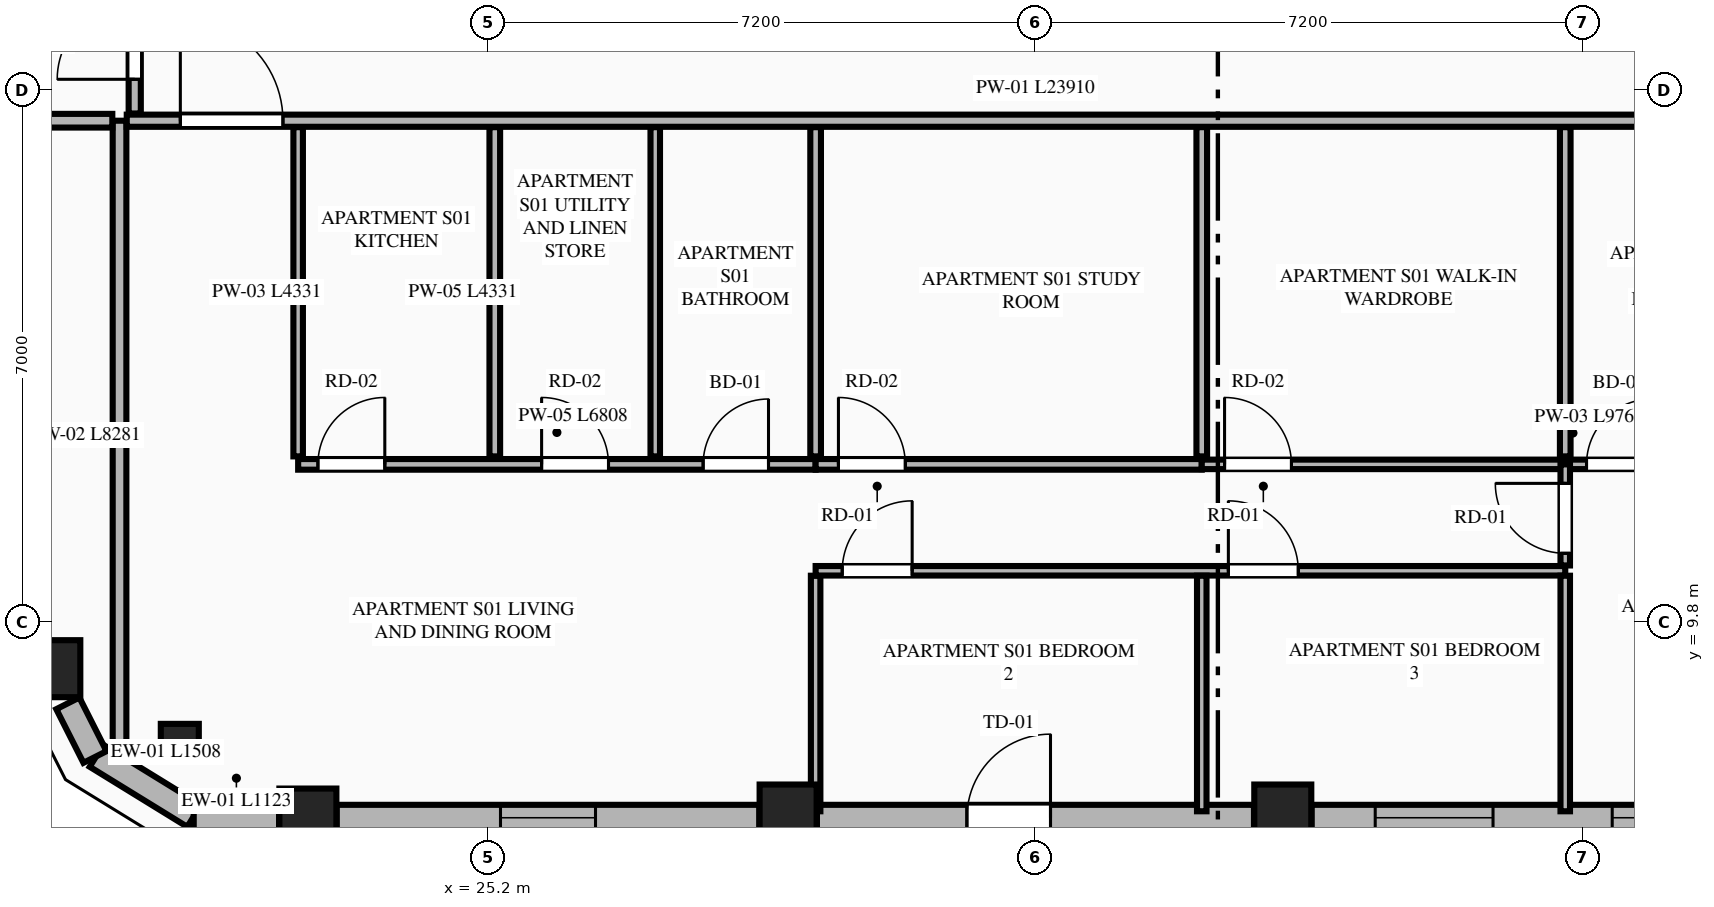
"""IFC4 building model, lengths in metres.
Left out: names, types, materials, properties, quantities, classifications, styles, units other than length and angle.
Written with IfcOpenShell. Run it as: python <this file> out.ifc"""

import sys

from ifc_helpers import new_model, si_unit, direction, frame, frame_2d, origin, origin_2d, place, context, subcontext, project, spatial, rectangle, extrude, element, fill, save


model = new_model("IFC4")
c1 = context("Model", 3, precision=1e-05, world=origin(), true_north=direction((0.0, 1.0)))
c2 = subcontext(c1, "Body", "Model", "MODEL_VIEW")
j1 = project(units=[si_unit("LENGTHUNIT", "METRE"), si_unit("PLANEANGLEUNIT", "RADIAN")], contexts=[c1])
p1 = place(None, origin())
s1 = spatial("IfcSite", under=j1, at=p1, CompositionType="ELEMENT")
p2 = place(p1, origin())
s2 = spatial("IfcBuilding", under=s1, at=p2, CompositionType="ELEMENT")
p3 = place(p2, frame((0.0, 0.0, 248.9)))
s3 = spatial("IfcBuildingStorey", under=s2, at=p3, CompositionType="ELEMENT", Elevation=248.9)
for number, where, z_axis, x_axis in (
    (1, (22.828, 7.239, 0.0), (0.0, 0.0, 1.0), (1.0, 0.0, 0.0)),
    (2, (29.146, 7.292, 0.0), (0.0, 0.0, 1.0), (1.0, 0.0, 0.0)),
    (3, (35.654, 7.292, 0.0), (0.0, 0.0, 1.0), (1.0, 0.0, 0.0)),
    (4, (19.459, 9.191, 0.0), (0.0, 0.0, 1.0), (1.0, 0.0, 0.0)),
):
    element("IfcColumn", number, at=place(p3, frame(where, z_axis=z_axis, x_axis=x_axis)), inside=s3, PredefinedType="COLUMN", context=c2, shape_type="SweptSolid", body=[
        extrude(rectangle(XDim=0.75, YDim=0.75, at=origin_2d()), origin(), (0.0, 0.0, 1.0), 3.65),
    ])
p4 = place(p3, frame((21.143, 8.215, 0.0), z_axis=(0.0, 0.0, 1.0), x_axis=(0.865256437757, -0.501329529272, 0.0)))
e5 = element("IfcColumn", 5, at=p4, inside=s3, PredefinedType="PILASTER", context=c2, shape_type="SweptSolid", body=[
    extrude(rectangle(XDim=0.5, YDim=0.35, at=origin_2d()), origin(), (0.0, 0.0, 1.0), 3.65),
])
p5 = place(p3, frame((20.047, 8.045, 0.0), z_axis=(0.0, 0.0, 1.0), x_axis=(0.851680557619, -0.52406128246, 0.0)))
e6 = element("IfcWall", 6, at=p5, inside=s3, PredefinedType="STANDARD", context=c2, shape_type="SweptSolid", body=[
    extrude(rectangle(XDim=1.508, YDim=0.34, at=frame_2d((0.754, 0.0))), origin(), (0.0, 0.0, 1.0), 3.45),
])
p6 = place(p3, frame((21.326, 7.23, 0.0), z_axis=(0.0, 0.0, 1.0), x_axis=(1.0, 0.0, 0.0)))
e7 = element("IfcWall", 7, at=p6, inside=s3, PredefinedType="STANDARD", context=c2, shape_type="SweptSolid", body=[
    extrude(rectangle(XDim=1.123, YDim=0.34, at=frame_2d((0.562, 0.0))), origin(), (0.0, 0.0, 1.0), 3.45),
])
p7 = place(p3, frame((23.207, 7.23, 0.0), z_axis=(0.0, 0.0, 1.0), x_axis=(1.0, 0.0, 0.0)))
e8 = element("IfcWall", 8, at=p7, inside=s3, PredefinedType="STANDARD", context=c2, shape_type="SweptSolid", body=[
    extrude(rectangle(XDim=5.56, YDim=0.34, at=frame_2d((2.78, 0.0))), origin(), (0.0, 0.0, 1.0), 2.983),
])
p8 = place(p7, frame((2.155, 0.0, 0.75)))
e9 = element("IfcOpeningElement", 9, at=p8, cuts=e8, PredefinedType="OPENING", context=c2, shape_type="SweptSolid", body=[
    extrude(rectangle(XDim=1.25, YDim=1.95, at=frame_2d((0.625, 0.975))), frame((0.0, 0.18, 0.0), z_axis=(0.0, -1.0, 0.0), x_axis=(1.0, 0.0, 0.0)), (0.0, 0.0, 1.0), 0.36),
])
p9 = place(p3, frame((29.525, 7.23, 0.0), z_axis=(0.0, 0.0, 1.0), x_axis=(1.0, 0.0, 0.0)))
e10 = element("IfcWall", 10, at=p9, inside=s3, PredefinedType="STANDARD", context=c2, shape_type="SweptSolid", body=[
    extrude(rectangle(XDim=5.75, YDim=0.34, at=frame_2d((2.875, 0.0))), origin(), (0.0, 0.0, 1.0), 2.983),
])
p10 = place(p9, frame((1.973, 0.0, 0.0)))
e11 = element("IfcOpeningElement", 11, at=p10, cuts=e10, PredefinedType="OPENING", context=c2, shape_type="SweptSolid", body=[
    extrude(rectangle(XDim=1.1, YDim=2.25, at=frame_2d((0.55, 1.125))), frame((0.0, 0.18, 0.0), z_axis=(0.0, -1.0, 0.0), x_axis=(1.0, 0.0, 0.0)), (0.0, 0.0, 1.0), 0.36),
])
p11 = place(p3, frame((36.033, 7.23, 0.0), z_axis=(0.0, 0.0, 1.0), x_axis=(1.0, 0.0, 0.0)))
e12 = element("IfcWall", 12, at=p11, inside=s3, PredefinedType="STANDARD", context=c2, shape_type="SweptSolid", body=[
    extrude(rectangle(XDim=5.56, YDim=0.34, at=frame_2d((2.78, 0.0))), origin(), (0.0, 0.0, 1.0), 2.983),
])
p12 = place(p11, frame((0.837, 0.0, 0.75)))
e13 = element("IfcOpeningElement", 13, at=p12, cuts=e12, PredefinedType="OPENING", context=c2, shape_type="SweptSolid", body=[
    extrude(rectangle(XDim=1.55, YDim=2.05, at=frame_2d((0.775, 1.025))), frame((0.0, 0.18, 0.0), z_axis=(0.0, -1.0, 0.0), x_axis=(1.0, 0.0, 0.0)), (0.0, 0.0, 1.0), 0.36),
])
p13 = place(p11, frame((3.955, 0.0, 0.75)))
e14 = element("IfcOpeningElement", 14, at=p13, cuts=e12, PredefinedType="OPENING", context=c2, shape_type="SweptSolid", body=[
    extrude(rectangle(XDim=1.1, YDim=2.0, at=frame_2d((0.55, 1.0))), frame((0.0, 0.18, 0.0), z_axis=(0.0, -1.0, 0.0), x_axis=(1.0, 0.0, 0.0)), (0.0, 0.0, 1.0), 0.36),
])
p14 = place(p3, frame((19.67, 8.735, 0.0), z_axis=(0.0, 0.0, 1.0), x_axis=(0.451404919072, -0.89231922485, 0.0)))
e15 = element("IfcWall", 15, at=p14, inside=s3, PredefinedType="STANDARD", context=c2, shape_type="SweptSolid", body=[
    extrude(rectangle(XDim=0.791, YDim=0.34, at=frame_2d((0.396, 0.0))), origin(), (0.0, 0.0, 1.0), 3.45),
])
p15 = place(p3, frame((20.35, 8.119, 0.0), z_axis=(0.0, 0.0, 1.0), x_axis=(0.0, 1.0, 0.0)))
e16 = element("IfcWall", 16, at=p15, inside=s3, PredefinedType="PARTITIONING", context=c2, shape_type="SweptSolid", body=[
    extrude(rectangle(XDim=8.281, YDim=0.18, at=frame_2d((4.141, 0.0))), origin(), (0.0, 0.0, 1.0), 3.45),
])
p16 = place(p3, frame((20.445, 16.4, 0.0), z_axis=(0.0, 0.0, 1.0), x_axis=(1.0, 0.0, 0.0)))
e17 = element("IfcWall", 17, at=p16, inside=s3, PredefinedType="PARTITIONING", context=c2, shape_type="SweptSolid", body=[
    extrude(rectangle(XDim=23.91, YDim=0.16, at=frame_2d((11.955, 0.0))), origin(), (0.0, 0.0, 1.0), 3.45),
])
p17 = place(p16, frame((0.705, 0.0, 0.0)))
e18 = element("IfcOpeningElement", 18, at=p17, cuts=e17, PredefinedType="OPENING", context=c2, shape_type="SweptSolid", body=[
    extrude(rectangle(XDim=1.35, YDim=2.35, at=frame_2d((0.675, 1.175))), frame((0.0, 0.09, 0.0), z_axis=(0.0, -1.0, 0.0), x_axis=(1.0, 0.0, 0.0)), (0.0, 0.0, 1.0), 0.18),
])
p18 = place(p3, frame((22.7, 11.984, 0.0), z_axis=(0.0, 0.0, 1.0), x_axis=(0.0, 1.0, 0.0)))
e19 = element("IfcWall", 19, at=p18, inside=s3, PredefinedType="PARTITIONING", context=c2, shape_type="SweptSolid", body=[
    extrude(rectangle(XDim=4.331, YDim=0.125, at=frame_2d((2.166, 0.0))), origin(), (0.0, 0.0, 1.0), 2.907),
])
p19 = place(p3, frame((22.7, 11.879, 0.0), z_axis=(0.0, 0.0, 1.0), x_axis=(1.0, 0.0, 0.0)))
e20 = element("IfcWall", 20, at=p19, inside=s3, PredefinedType="PLUMBINGWALL", context=c2, shape_type="SweptSolid", body=[
    extrude(rectangle(XDim=6.808, YDim=0.14, at=frame_2d((3.404, 0.0))), origin(), (0.0, 0.0, 1.0), 3.45),
])
p20 = place(p19, frame((5.328, 0.0, 0.0)))
e21 = element("IfcOpeningElement", 21, at=p20, cuts=e20, PredefinedType="OPENING", context=c2, shape_type="SweptSolid", body=[
    extrude(rectangle(XDim=0.86, YDim=2.1, at=frame_2d((0.43, 1.05))), frame((0.0, 0.08, 0.0), z_axis=(0.0, -1.0, 0.0), x_axis=(1.0, 0.0, 0.0)), (0.0, 0.0, 1.0), 0.16),
])
p21 = place(p19, frame((0.26, 0.0, 0.0)))
e22 = element("IfcOpeningElement", 22, at=p21, cuts=e20, PredefinedType="OPENING", context=c2, shape_type="SweptSolid", body=[
    extrude(rectangle(XDim=0.88, YDim=2.15, at=frame_2d((0.44, 1.075))), frame((0.0, 0.08, 0.0), z_axis=(0.0, -1.0, 0.0), x_axis=(1.0, 0.0, 0.0)), (0.0, 0.0, 1.0), 0.16),
])
p22 = place(p19, frame((3.203, 0.0, 0.0)))
e23 = element("IfcOpeningElement", 23, at=p22, cuts=e20, PredefinedType="OPENING", context=c2, shape_type="SweptSolid", body=[
    extrude(rectangle(XDim=0.88, YDim=2.15, at=frame_2d((0.44, 1.075))), frame((0.0, 0.08, 0.0), z_axis=(0.0, -1.0, 0.0), x_axis=(1.0, 0.0, 0.0)), (0.0, 0.0, 1.0), 0.16),
])
p23 = place(p3, frame((29.508, 11.879, 0.0), z_axis=(0.0, 0.0, 1.0), x_axis=(1.0, 0.0, 0.0)))
e24 = element("IfcWall", 24, at=p23, inside=s3, PredefinedType="PLUMBINGWALL", context=c2, shape_type="SweptSolid", body=[
    extrude(rectangle(XDim=5.08, YDim=0.14, at=frame_2d((2.54, 0.0))), origin(), (0.0, 0.0, 1.0), 3.45),
])
p24 = place(p23, frame((0.3, 0.0, 0.0)))
e25 = element("IfcOpeningElement", 25, at=p24, cuts=e24, PredefinedType="OPENING", context=c2, shape_type="SweptSolid", body=[
    extrude(rectangle(XDim=0.88, YDim=2.15, at=frame_2d((0.44, 1.075))), frame((0.0, 0.08, 0.0), z_axis=(0.0, -1.0, 0.0), x_axis=(1.0, 0.0, 0.0)), (0.0, 0.0, 1.0), 0.16),
])
p25 = place(p3, frame((34.588, 11.879, 0.0), z_axis=(0.0, 0.0, 1.0), x_axis=(1.0, 0.0, 0.0)))
e26 = element("IfcWall", 26, at=p25, inside=s3, PredefinedType="PARTITIONING", context=c2, shape_type="SweptSolid", body=[
    extrude(rectangle(XDim=9.767, YDim=0.125, at=frame_2d((4.884, 0.0))), origin(), (0.0, 0.0, 1.0), 3.45),
])
p26 = place(p25, frame((5.062, 0.0, 0.0)))
e27 = element("IfcOpeningElement", 27, at=p26, cuts=e26, PredefinedType="OPENING", context=c2, shape_type="SweptSolid", body=[
    extrude(rectangle(XDim=0.86, YDim=2.1, at=frame_2d((0.43, 1.05))), frame((0.0, 0.073, 0.0), z_axis=(0.0, -1.0, 0.0), x_axis=(1.0, 0.0, 0.0)), (0.0, 0.0, 1.0), 0.145),
])
p27 = place(p25, frame((8.226, 0.0, 0.0)))
e28 = element("IfcOpeningElement", 28, at=p27, cuts=e26, PredefinedType="OPENING", context=c2, shape_type="SweptSolid", body=[
    extrude(rectangle(XDim=0.88, YDim=2.15, at=frame_2d((0.44, 1.075))), frame((0.0, 0.073, 0.0), z_axis=(0.0, -1.0, 0.0), x_axis=(1.0, 0.0, 0.0)), (0.0, 0.0, 1.0), 0.145),
])
p28 = place(p25, frame((0.3, 0.0, 0.0)))
e29 = element("IfcOpeningElement", 29, at=p28, cuts=e26, PredefinedType="OPENING", context=c2, shape_type="SweptSolid", body=[
    extrude(rectangle(XDim=0.88, YDim=2.15, at=frame_2d((0.44, 1.075))), frame((0.0, 0.073, 0.0), z_axis=(0.0, -1.0, 0.0), x_axis=(1.0, 0.0, 0.0)), (0.0, 0.0, 1.0), 0.145),
])
p29 = place(p3, frame((25.287, 11.984, 0.0), z_axis=(0.0, 0.0, 1.0), x_axis=(0.0, 1.0, 0.0)))
e30 = element("IfcWall", 30, at=p29, inside=s3, PredefinedType="PLUMBINGWALL", context=c2, shape_type="SweptSolid", body=[
    extrude(rectangle(XDim=4.331, YDim=0.14, at=frame_2d((2.166, 0.0))), origin(), (0.0, 0.0, 1.0), 3.45),
])
p30 = place(p3, frame((27.398, 11.984, 0.0), z_axis=(0.0, 0.0, 1.0), x_axis=(0.0, 1.0, 0.0)))
e31 = element("IfcWall", 31, at=p30, inside=s3, PredefinedType="PARTITIONING", context=c2, shape_type="SweptSolid", body=[
    extrude(rectangle(XDim=4.331, YDim=0.125, at=frame_2d((2.166, 0.0))), origin(), (0.0, 0.0, 1.0), 3.45),
])
p31 = place(p3, frame((29.508, 7.315, 0.0), z_axis=(0.0, 0.0, 1.0), x_axis=(0.0, 1.0, 0.0)))
e32 = element("IfcWall", 32, at=p31, inside=s3, PredefinedType="PARTITIONING", context=c2, shape_type="SweptSolid", body=[
    extrude(rectangle(XDim=3.099, YDim=0.125, at=frame_2d((1.55, 0.0))), origin(), (0.0, 0.0, 1.0), 3.45),
])
p32 = place(p3, frame((29.508, 10.479, 0.0), z_axis=(0.0, 0.0, 1.0), x_axis=(1.0, 0.0, 0.0)))
e33 = element("IfcWall", 33, at=p32, inside=s3, PredefinedType="PARTITIONING", context=c2, shape_type="SweptSolid", body=[
    extrude(rectangle(XDim=9.862, YDim=0.125, at=frame_2d((4.931, 0.0))), origin(), (0.0, 0.0, 1.0), 3.45),
])
p33 = place(p32, frame((0.35, 0.0, 0.0)))
e34 = element("IfcOpeningElement", 34, at=p33, cuts=e33, PredefinedType="OPENING", context=c2, shape_type="SweptSolid", body=[
    extrude(rectangle(XDim=0.92, YDim=2.15, at=frame_2d((0.46, 1.075))), frame((0.0, 0.073, 0.0), z_axis=(0.0, -1.0, 0.0), x_axis=(1.0, 0.0, 0.0)), (0.0, 0.0, 1.0), 0.145),
])
p34 = place(p32, frame((5.43, 0.0, 0.0)))
e35 = element("IfcOpeningElement", 35, at=p34, cuts=e33, PredefinedType="OPENING", context=c2, shape_type="SweptSolid", body=[
    extrude(rectangle(XDim=0.92, YDim=2.15, at=frame_2d((0.46, 1.075))), frame((0.0, 0.073, 0.0), z_axis=(0.0, -1.0, 0.0), x_axis=(1.0, 0.0, 0.0)), (0.0, 0.0, 1.0), 0.145),
])
p35 = place(p3, frame((39.37, 10.549, 0.0), z_axis=(0.0, 0.0, 1.0), x_axis=(0.0, 1.0, 0.0)))
e36 = element("IfcWall", 36, at=p35, inside=s3, PredefinedType="PARTITIONING", context=c2, shape_type="SweptSolid", body=[
    extrude(rectangle(XDim=1.33, YDim=0.125, at=frame_2d((0.665, 0.0))), origin(), (0.0, 0.0, 1.0), 3.45),
])
p36 = place(p35, frame((0.16, 0.0, 0.0)))
e37 = element("IfcOpeningElement", 37, at=p36, cuts=e36, PredefinedType="OPENING", context=c2, shape_type="SweptSolid", body=[
    extrude(rectangle(XDim=0.92, YDim=2.15, at=frame_2d((0.46, 1.075))), frame((0.0, 0.073, 0.0), z_axis=(0.0, -1.0, 0.0), x_axis=(1.0, 0.0, 0.0)), (0.0, 0.0, 1.0), 0.145),
])
for number, where, z_axis, x_axis in (
    (38, (29.508, 11.984, 0.0), (0.0, 0.0, 1.0), (0.0, 1.0, 0.0)),
    (39, (34.588, 11.984, 0.0), (0.0, 0.0, 1.0), (0.0, 1.0, 0.0)),
):
    element("IfcWall", number, at=place(p3, frame(where, z_axis=z_axis, x_axis=x_axis)), inside=s3, PredefinedType="PLUMBINGWALL", context=c2, shape_type="SweptSolid", body=[
        extrude(rectangle(XDim=4.331, YDim=0.14, at=frame_2d((2.166, 0.0))), origin(), (0.0, 0.0, 1.0), 3.45),
    ])
for number, where, z_axis, x_axis in (
    (40, (34.588, 7.315, 0.0), (0.0, 0.0, 1.0), (0.0, 1.0, 0.0)),
    (41, (39.37, 7.315, 0.0), (0.0, 0.0, 1.0), (0.0, 1.0, 0.0)),
):
    element("IfcWall", number, at=place(p3, frame(where, z_axis=z_axis, x_axis=x_axis)), inside=s3, PredefinedType="PARTITIONING", context=c2, shape_type="SweptSolid", body=[
        extrude(rectangle(XDim=3.099, YDim=0.125, at=frame_2d((1.55, 0.0))), origin(), (0.0, 0.0, 1.0), 3.45),
    ])
p37 = place(p3, frame((39.37, 11.984, 0.0), z_axis=(0.0, 0.0, 1.0), x_axis=(0.0, 1.0, 0.0)))
e42 = element("IfcWall", 42, at=p37, inside=s3, PredefinedType="PLUMBINGWALL", context=c2, shape_type="SweptSolid", body=[
    extrude(rectangle(XDim=4.331, YDim=0.14, at=frame_2d((2.166, 0.0))), origin(), (0.0, 0.0, 1.0), 3.45),
])
p38 = place(p3, frame((16.034, 16.4, 0.0), z_axis=(0.0, 0.0, 1.0), x_axis=(1.0, 0.0, 0.0)))
e43 = element("IfcWall", 43, at=p38, inside=s3, PredefinedType="PARTITIONING", context=c2, shape_type="SweptSolid", body=[
    extrude(rectangle(XDim=4.221, YDim=0.18, at=frame_2d((2.11, 0.0))), origin(), (0.0, 0.0, 1.0), 3.45),
])
p39 = place(p3, frame((20.55, 16.495, 0.0), z_axis=(0.0, 0.0, 1.0), x_axis=(0.0, 1.0, 0.0)))
e44 = element("IfcWall", 44, at=p39, inside=s3, PredefinedType="PARTITIONING", context=c2, shape_type="SweptSolid", body=[
    extrude(rectangle(XDim=18.41, YDim=0.16, at=frame_2d((9.205, 0.0))), origin(), (0.0, 0.0, 1.0), 3.137),
])
p40 = place(p39, frame((0.45, 0.0, 0.0)))
e45 = element("IfcOpeningElement", 45, at=p40, cuts=e44, PredefinedType="OPENING", context=c2, shape_type="SweptSolid", body=[
    extrude(rectangle(XDim=1.02, YDim=2.25, at=frame_2d((0.51, 1.125))), frame((0.0, 0.09, 0.0), z_axis=(0.0, -1.0, 0.0), x_axis=(1.0, 0.0, 0.0)), (0.0, 0.0, 1.0), 0.18),
])
p41 = place(p8, origin())
e46 = element("IfcWindow", 46, at=p41, inside=s3, PartitioningType="SINGLE_PANEL", PredefinedType="WINDOW", context=c2, shape_type="SweptSolid", body=[
    extrude(rectangle(XDim=1.25, YDim=1.95, at=frame_2d((0.625, 0.975))), frame((0.0, 0.03, 0.0), z_axis=(0.0, -1.0, 0.0), x_axis=(1.0, 0.0, 0.0)), (0.0, 0.0, 1.0), 0.06),
])
fill(e9, e46)
p42 = place(p10, origin())
e47 = element("IfcDoor", 47, at=p42, inside=s3, OperationType="SINGLE_SWING_RIGHT", PredefinedType="DOOR", context=c2, shape_type="SweptSolid", body=[
    extrude(rectangle(XDim=1.1, YDim=2.25, at=frame_2d((0.55, 1.125))), frame((0.0, 0.025, 0.0), z_axis=(0.0, -1.0, 0.0), x_axis=(1.0, 0.0, 0.0)), (0.0, 0.0, 1.0), 0.05),
])
fill(e11, e47)
p43 = place(p12, origin())
e48 = element("IfcWindow", 48, at=p43, inside=s3, PartitioningType="SINGLE_PANEL", PredefinedType="WINDOW", context=c2, shape_type="SweptSolid", body=[
    extrude(rectangle(XDim=1.55, YDim=2.05, at=frame_2d((0.775, 1.025))), frame((0.0, 0.03, 0.0), z_axis=(0.0, -1.0, 0.0), x_axis=(1.0, 0.0, 0.0)), (0.0, 0.0, 1.0), 0.06),
])
fill(e13, e48)
p44 = place(p20, origin())
e49 = element("IfcDoor", 49, at=p44, inside=s3, OperationType="SINGLE_SWING_RIGHT", PredefinedType="DOOR", context=c2, shape_type="SweptSolid", body=[
    extrude(rectangle(XDim=0.86, YDim=2.1, at=frame_2d((0.43, 1.05))), frame((0.0, 0.025, 0.0), z_axis=(0.0, -1.0, 0.0), x_axis=(1.0, 0.0, 0.0)), (0.0, 0.0, 1.0), 0.05),
])
fill(e21, e49)
p45 = place(p26, origin())
e50 = element("IfcDoor", 50, at=p45, inside=s3, OperationType="SINGLE_SWING_RIGHT", PredefinedType="DOOR", context=c2, shape_type="SweptSolid", body=[
    extrude(rectangle(XDim=0.86, YDim=2.1, at=frame_2d((0.43, 1.05))), frame((0.0, 0.025, 0.0), z_axis=(0.0, -1.0, 0.0), x_axis=(1.0, 0.0, 0.0)), (0.0, 0.0, 1.0), 0.05),
])
fill(e27, e50)
p46 = place(p17, origin())
e51 = element("IfcDoor", 51, at=p46, inside=s3, OperationType="SINGLE_SWING_LEFT", PredefinedType="DOOR", context=c2, shape_type="SweptSolid", body=[
    extrude(rectangle(XDim=1.35, YDim=2.35, at=frame_2d((0.675, 1.175))), frame((0.0, 0.025, 0.0), z_axis=(0.0, -1.0, 0.0), x_axis=(1.0, 0.0, 0.0)), (0.0, 0.0, 1.0), 0.05),
])
fill(e18, e51)
p47 = place(p21, origin())
e52 = element("IfcDoor", 52, at=p47, inside=s3, OperationType="SINGLE_SWING_RIGHT", PredefinedType="DOOR", context=c2, shape_type="SweptSolid", body=[
    extrude(rectangle(XDim=0.88, YDim=2.15, at=frame_2d((0.44, 1.075))), frame((0.0, 0.025, 0.0), z_axis=(0.0, -1.0, 0.0), x_axis=(1.0, 0.0, 0.0)), (0.0, 0.0, 1.0), 0.05),
])
fill(e22, e52)
p48 = place(p22, origin())
e53 = element("IfcDoor", 53, at=p48, inside=s3, OperationType="SINGLE_SWING_LEFT", PredefinedType="DOOR", context=c2, shape_type="SweptSolid", body=[
    extrude(rectangle(XDim=0.88, YDim=2.15, at=frame_2d((0.44, 1.075))), frame((0.0, 0.025, 0.0), z_axis=(0.0, -1.0, 0.0), x_axis=(1.0, 0.0, 0.0)), (0.0, 0.0, 1.0), 0.05),
])
fill(e23, e53)
p49 = place(p24, origin())
e54 = element("IfcDoor", 54, at=p49, inside=s3, OperationType="SINGLE_SWING_LEFT", PredefinedType="DOOR", context=c2, shape_type="SweptSolid", body=[
    extrude(rectangle(XDim=0.88, YDim=2.15, at=frame_2d((0.44, 1.075))), frame((0.0, 0.025, 0.0), z_axis=(0.0, -1.0, 0.0), x_axis=(1.0, 0.0, 0.0)), (0.0, 0.0, 1.0), 0.05),
])
fill(e25, e54)
p50 = place(p33, origin())
e55 = element("IfcDoor", 55, at=p50, inside=s3, OperationType="SINGLE_SWING_RIGHT", PredefinedType="DOOR", context=c2, shape_type="SweptSolid", body=[
    extrude(rectangle(XDim=0.92, YDim=2.15, at=frame_2d((0.46, 1.075))), frame((0.0, 0.025, 0.0), z_axis=(0.0, -1.0, 0.0), x_axis=(1.0, 0.0, 0.0)), (0.0, 0.0, 1.0), 0.05),
])
fill(e34, e55)
p51 = place(p34, origin())
e56 = element("IfcDoor", 56, at=p51, inside=s3, OperationType="SINGLE_SWING_LEFT", PredefinedType="DOOR", context=c2, shape_type="SweptSolid", body=[
    extrude(rectangle(XDim=0.92, YDim=2.15, at=frame_2d((0.46, 1.075))), frame((0.0, 0.025, 0.0), z_axis=(0.0, -1.0, 0.0), x_axis=(1.0, 0.0, 0.0)), (0.0, 0.0, 1.0), 0.05),
])
fill(e35, e56)
p52 = place(p36, origin())
e57 = element("IfcDoor", 57, at=p52, inside=s3, OperationType="SINGLE_SWING_RIGHT", PredefinedType="DOOR", context=c2, shape_type="SweptSolid", body=[
    extrude(rectangle(XDim=0.92, YDim=2.15, at=frame_2d((0.46, 1.075))), frame((0.0, 0.025, 0.0), z_axis=(0.0, -1.0, 0.0), x_axis=(1.0, 0.0, 0.0)), (0.0, 0.0, 1.0), 0.05),
])
fill(e37, e57)
p53 = place(p28, origin())
e58 = element("IfcDoor", 58, at=p53, inside=s3, OperationType="SINGLE_SWING_LEFT", PredefinedType="DOOR", context=c2, shape_type="SweptSolid", body=[
    extrude(rectangle(XDim=0.88, YDim=2.15, at=frame_2d((0.44, 1.075))), frame((0.0, 0.025, 0.0), z_axis=(0.0, -1.0, 0.0), x_axis=(1.0, 0.0, 0.0)), (0.0, 0.0, 1.0), 0.05),
])
fill(e29, e58)
p54 = place(p40, origin())
e59 = element("IfcDoor", 59, at=p54, inside=s3, OperationType="SINGLE_SWING_LEFT", PredefinedType="DOOR", context=c2, shape_type="SweptSolid", body=[
    extrude(rectangle(XDim=1.02, YDim=2.25, at=frame_2d((0.51, 1.125))), frame((0.0, 0.025, 0.0), z_axis=(0.0, -1.0, 0.0), x_axis=(1.0, 0.0, 0.0)), (0.0, 0.0, 1.0), 0.05),
])
fill(e45, e59)
p55 = place(p13, origin())
e60 = element("IfcWindow", 60, at=p55, inside=s3, PartitioningType="SINGLE_PANEL", PredefinedType="WINDOW", context=c2, shape_type="SweptSolid", body=[
    extrude(rectangle(XDim=1.1, YDim=2.0, at=frame_2d((0.55, 1.0))), frame((0.0, 0.03, 0.0), z_axis=(0.0, -1.0, 0.0), x_axis=(1.0, 0.0, 0.0)), (0.0, 0.0, 1.0), 0.06),
])
fill(e14, e60)
save(model, sys.argv[1])
